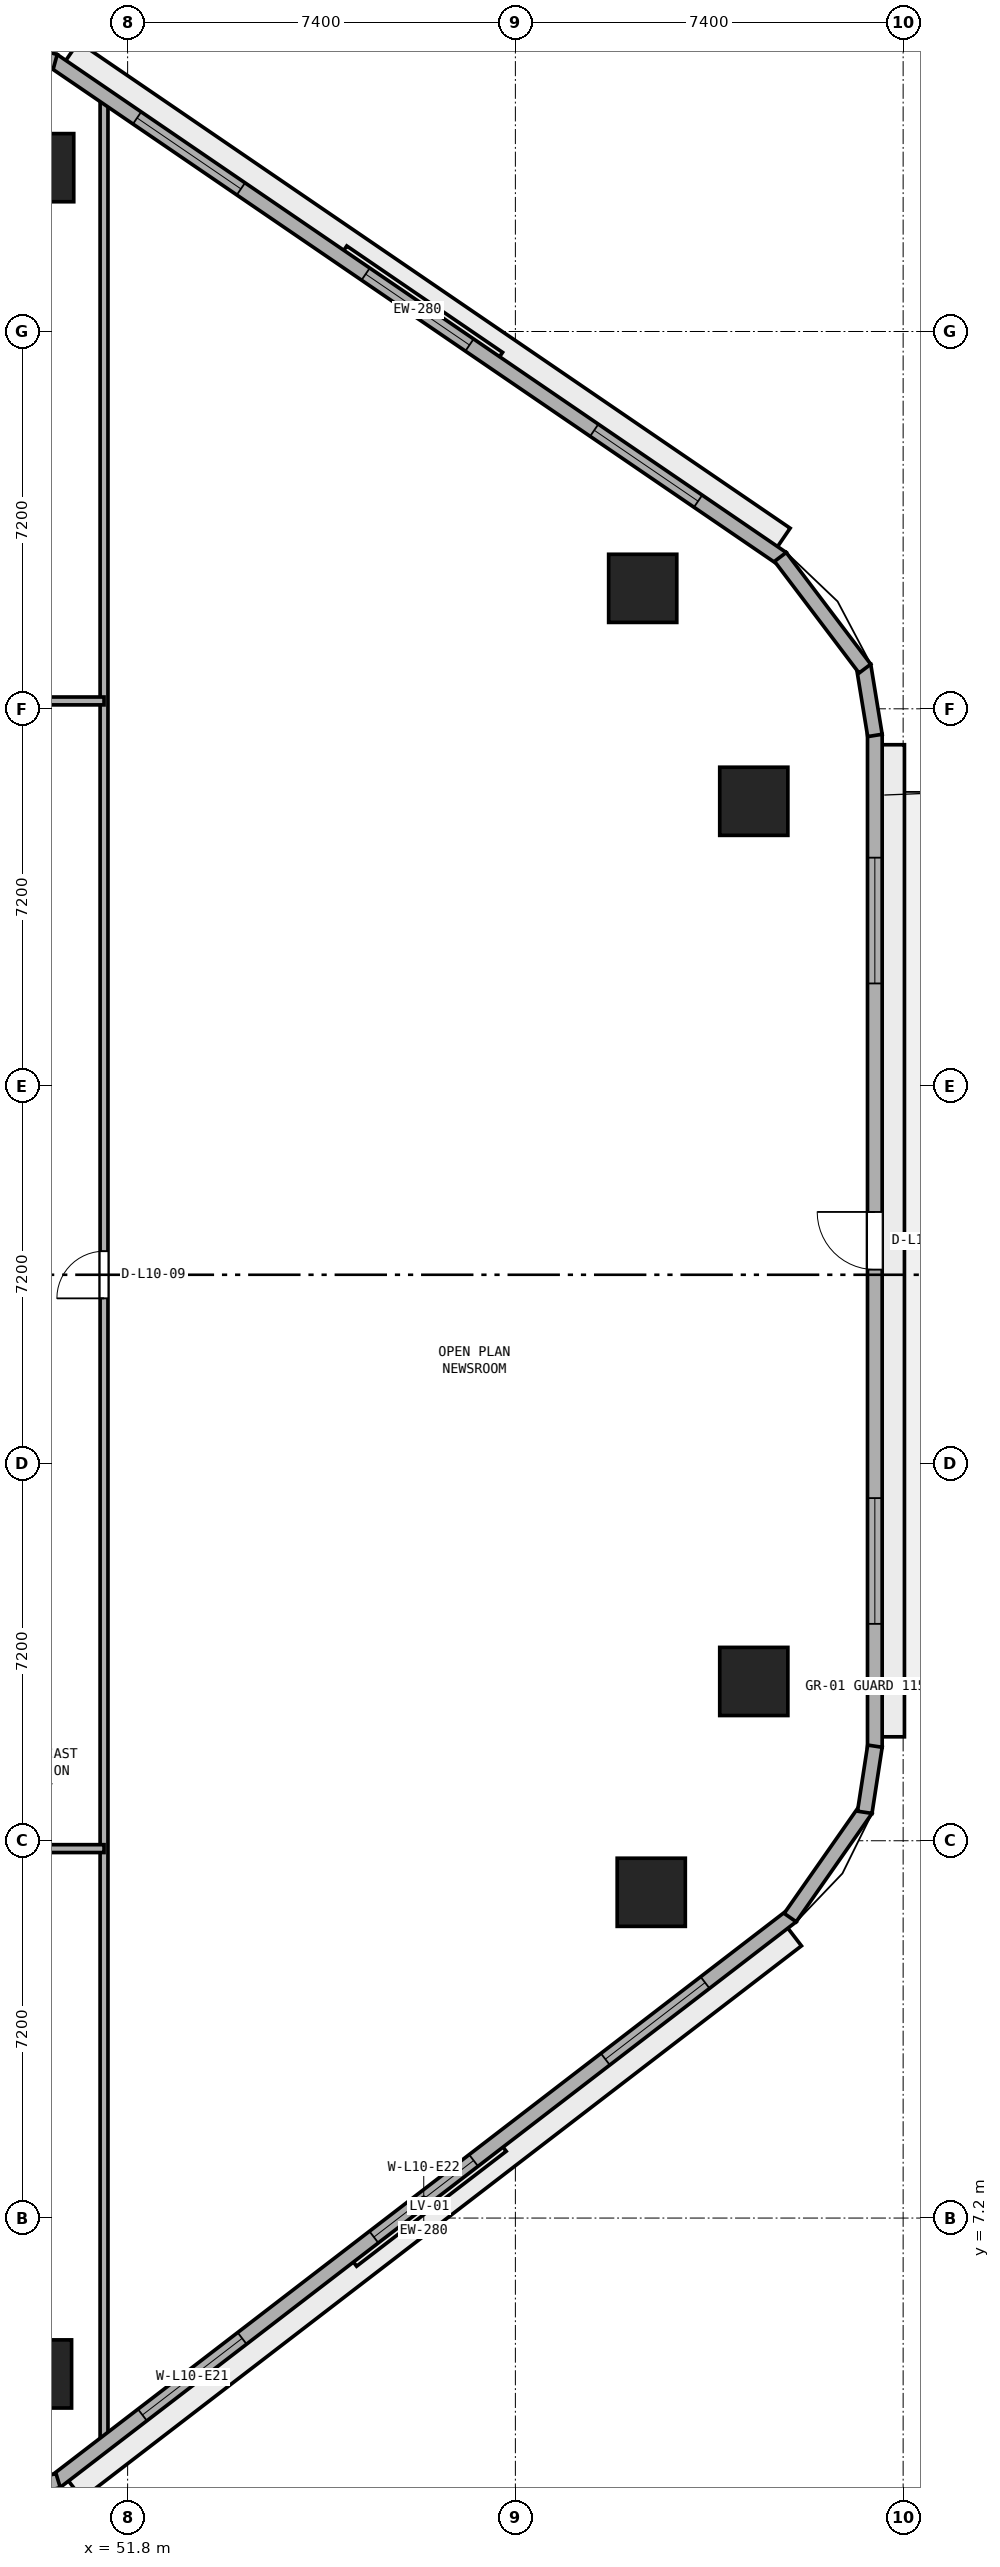
"""IFC4 building model, lengths in metres.
Left out: names, types, materials, properties, quantities, classifications, styles, units other than length and angle.
Written with IfcOpenShell. Run it as: python <this file> out.ifc"""

import sys

from ifc_helpers import new_model, si_unit, direction, frame, frame_2d, origin, origin_2d, place, context, subcontext, project, spatial, rectangle, extrude, element, fill, save


model = new_model("IFC4")
c1 = context("Model", 3, precision=1e-05, world=origin(), true_north=direction((0.0, 1.0)))
c2 = subcontext(c1, "Body", "Model", "MODEL_VIEW")
j1 = project(units=[si_unit("LENGTHUNIT", "METRE"), si_unit("PLANEANGLEUNIT", "RADIAN")], contexts=[c1])
p1 = place(None, origin())
s1 = spatial("IfcSite", under=j1, at=p1, CompositionType="ELEMENT")
p2 = place(p1, origin())
s2 = spatial("IfcBuilding", under=s1, at=p2, CompositionType="ELEMENT")
p3 = place(p2, frame((0.0, 0.0, 44.0)))
s3 = spatial("IfcBuildingStorey", under=s2, at=p3, CompositionType="ELEMENT", Elevation=44.0)
for number, where, z_axis, x_axis in (
    (1, (50.081, 4.225, 0.0), (0.0, 0.0, 1.0), (1.0, 0.0, 0.0)),
    (2, (61.793, 13.416, 0.0), (0.0, 0.0, 1.0), (1.0, 0.0, 0.0)),
    (3, (63.75, 17.44, 0.0), (0.0, 0.0, 1.0), (1.0, 0.0, 0.0)),
    (4, (63.75, 34.235, 0.0), (0.0, 0.0, 1.0), (1.0, 0.0, 0.0)),
    (5, (61.63, 38.299, 0.0), (0.0, 0.0, 1.0), (1.0, 0.0, 0.0)),
    (6, (50.122, 46.326, 0.0), (0.0, 0.0, 1.0), (1.0, 0.0, 0.0)),
):
    element("IfcColumn", number, at=place(p3, frame(where, z_axis=z_axis, x_axis=x_axis)), inside=s3, PredefinedType="COLUMN", context=c2, shape_type="SweptSolid", body=[
        extrude(rectangle(XDim=1.3, YDim=1.3, at=origin_2d()), origin(), (0.0, 0.0, 1.0), 3.8),
    ])
p4 = place(p3, frame((51.35, 2.843, 0.0), z_axis=(0.0, 0.0, 1.0), x_axis=(0.0, 1.0, 0.0)))
e7 = element("IfcWall", 7, at=p4, inside=s3, PredefinedType="PARTITIONING", context=c2, shape_type="SweptSolid", body=[
    extrude(rectangle(XDim=44.892, YDim=0.15, at=frame_2d((22.446, 0.0))), origin(), (0.0, 0.0, 1.0), 3.525),
])
p5 = place(p4, frame((21.907, 0.0, 0.0)))
e8 = element("IfcOpeningElement", 8, at=p5, cuts=e7, PredefinedType="OPENING", context=c2, shape_type="SweptSolid", body=[
    extrude(rectangle(XDim=0.9, YDim=2.1, at=frame_2d((0.45, 1.05))), frame((0.0, 0.085, 0.0), z_axis=(0.0, -1.0, 0.0), x_axis=(1.0, 0.0, 0.0)), (0.0, 0.0, 1.0), 0.17),
])
p6 = place(p3, frame((22.65, 14.25, 0.0), z_axis=(0.0, 0.0, 1.0), x_axis=(1.0, 0.0, 0.0)))
e9 = element("IfcWall", 9, at=p6, inside=s3, PredefinedType="PARTITIONING", context=c2, shape_type="SweptSolid", body=[
    extrude(rectangle(XDim=28.7, YDim=0.15, at=frame_2d((14.35, 0.0))), origin(), (0.0, 0.0, 1.0), 3.525),
])
p7 = place(p6, frame((4.845, 0.0, 0.0)))
e10 = element("IfcOpeningElement", 10, at=p7, cuts=e9, PredefinedType="OPENING", context=c2, shape_type="SweptSolid", body=[
    extrude(rectangle(XDim=0.9, YDim=2.1, at=frame_2d((0.45, 1.05))), frame((0.0, 0.085, 0.0), z_axis=(0.0, -1.0, 0.0), x_axis=(1.0, 0.0, 0.0)), (0.0, 0.0, 1.0), 0.17),
])
p8 = place(p6, frame((15.65, 0.0, 0.0)))
e11 = element("IfcOpeningElement", 11, at=p8, cuts=e9, PredefinedType="OPENING", context=c2, shape_type="SweptSolid", body=[
    extrude(rectangle(XDim=0.9, YDim=2.1, at=frame_2d((0.45, 1.05))), frame((0.0, 0.085, 0.0), z_axis=(0.0, -1.0, 0.0), x_axis=(1.0, 0.0, 0.0)), (0.0, 0.0, 1.0), 0.17),
])
p9 = place(p6, frame((24.705, 0.0, 0.0)))
e12 = element("IfcOpeningElement", 12, at=p9, cuts=e9, PredefinedType="OPENING", context=c2, shape_type="SweptSolid", body=[
    extrude(rectangle(XDim=0.9, YDim=2.1, at=frame_2d((0.45, 1.05))), frame((0.0, 0.085, 0.0), z_axis=(0.0, -1.0, 0.0), x_axis=(1.0, 0.0, 0.0)), (0.0, 0.0, 1.0), 0.17),
])
p10 = place(p3, frame((22.65, 36.15, 0.0), z_axis=(0.0, 0.0, 1.0), x_axis=(1.0, 0.0, 0.0)))
e13 = element("IfcWall", 13, at=p10, inside=s3, PredefinedType="PARTITIONING", context=c2, shape_type="SweptSolid", body=[
    extrude(rectangle(XDim=28.7, YDim=0.15, at=frame_2d((14.35, 0.0))), origin(), (0.0, 0.0, 1.0), 3.525),
])
p11 = place(p10, frame((6.095, 0.0, 0.0)))
e14 = element("IfcOpeningElement", 14, at=p11, cuts=e13, PredefinedType="OPENING", context=c2, shape_type="SweptSolid", body=[
    extrude(rectangle(XDim=0.9, YDim=2.1, at=frame_2d((0.45, 1.05))), frame((0.0, 0.085, 0.0), z_axis=(0.0, -1.0, 0.0), x_axis=(1.0, 0.0, 0.0)), (0.0, 0.0, 1.0), 0.17),
])
p12 = place(p10, frame((20.155, 0.0, 0.0)))
e15 = element("IfcOpeningElement", 15, at=p12, cuts=e13, PredefinedType="OPENING", context=c2, shape_type="SweptSolid", body=[
    extrude(rectangle(XDim=1.0, YDim=2.12, at=frame_2d((0.5, 1.06))), frame((0.0, 0.085, 0.0), z_axis=(0.0, -1.0, 0.0), x_axis=(1.0, 0.0, 0.0)), (0.0, 0.0, 1.0), 0.17),
])
p13 = place(p3, frame((50.429, 2.172, 0.0), z_axis=(0.0, 0.0, 1.0), x_axis=(0.792937466367, 0.609303023488, 0.0)))
e16 = element("IfcWall", 16, at=p13, inside=s3, PredefinedType="STANDARD", context=c2, shape_type="SweptSolid", body=[
    extrude(rectangle(XDim=17.713, YDim=0.28, at=frame_2d((8.856, 0.0))), origin(), (0.0, 0.0, 1.0), 3.525),
])
p14 = place(p13, frame((2.085, 0.0, 0.9)))
e17 = element("IfcOpeningElement", 17, at=p14, cuts=e16, PredefinedType="OPENING", context=c2, shape_type="SweptSolid", body=[
    extrude(rectangle(XDim=2.4, YDim=1.75, at=frame_2d((1.2, 0.875))), frame((0.0, 0.15, 0.0), z_axis=(0.0, -1.0, 0.0), x_axis=(1.0, 0.0, 0.0)), (0.0, 0.0, 1.0), 0.3),
])
p15 = place(p13, frame((7.656, 0.0, 0.9)))
e18 = element("IfcOpeningElement", 18, at=p15, cuts=e16, PredefinedType="OPENING", context=c2, shape_type="SweptSolid", body=[
    extrude(rectangle(XDim=2.4, YDim=1.75, at=frame_2d((1.2, 0.875))), frame((0.0, 0.15, 0.0), z_axis=(0.0, -1.0, 0.0), x_axis=(1.0, 0.0, 0.0)), (0.0, 0.0, 1.0), 0.3),
])
p16 = place(p13, frame((13.227, 0.0, 0.9)))
e19 = element("IfcOpeningElement", 19, at=p16, cuts=e16, PredefinedType="OPENING", context=c2, shape_type="SweptSolid", body=[
    extrude(rectangle(XDim=2.4, YDim=1.75, at=frame_2d((1.2, 0.875))), frame((0.0, 0.15, 0.0), z_axis=(0.0, -1.0, 0.0), x_axis=(1.0, 0.0, 0.0)), (0.0, 0.0, 1.0), 0.3),
])
p17 = place(p3, frame((66.06, 16.183, 0.0), z_axis=(0.0, 0.0, 1.0), x_axis=(0.0, 1.0, 0.0)))
e20 = element("IfcWall", 20, at=p17, inside=s3, PredefinedType="STANDARD", context=c2, shape_type="SweptSolid", body=[
    extrude(rectangle(XDim=19.331, YDim=0.28, at=frame_2d((9.666, 0.0))), origin(), (0.0, 0.0, 1.0), 3.525),
])
p18 = place(p17, frame((9.115, 0.0, 0.0)))
e21 = element("IfcOpeningElement", 21, at=p18, cuts=e20, PredefinedType="OPENING", context=c2, shape_type="SweptSolid", body=[
    extrude(rectangle(XDim=1.1, YDim=2.2, at=frame_2d((0.55, 1.1))), frame((0.0, 0.15, 0.0), z_axis=(0.0, -1.0, 0.0), x_axis=(1.0, 0.0, 0.0)), (0.0, 0.0, 1.0), 0.3),
])
p19 = place(p17, frame((2.355, 0.0, 0.9)))
e22 = element("IfcOpeningElement", 22, at=p19, cuts=e20, PredefinedType="OPENING", context=c2, shape_type="SweptSolid", body=[
    extrude(rectangle(XDim=2.4, YDim=1.75, at=frame_2d((1.2, 0.875))), frame((0.0, 0.15, 0.0), z_axis=(0.0, -1.0, 0.0), x_axis=(1.0, 0.0, 0.0)), (0.0, 0.0, 1.0), 0.3),
])
p20 = place(p17, frame((14.576, 0.0, 0.9)))
e23 = element("IfcOpeningElement", 23, at=p20, cuts=e20, PredefinedType="OPENING", context=c2, shape_type="SweptSolid", body=[
    extrude(rectangle(XDim=2.4, YDim=1.75, at=frame_2d((1.2, 0.875))), frame((0.0, 0.15, 0.0), z_axis=(0.0, -1.0, 0.0), x_axis=(1.0, 0.0, 0.0)), (0.0, 0.0, 1.0), 0.3),
])
p21 = place(p3, frame((64.29, 38.867, 0.0), z_axis=(0.0, 0.0, 1.0), x_axis=(-0.825755550159, 0.564028165416, 0.0)))
e24 = element("IfcWall", 24, at=p21, inside=s3, PredefinedType="STANDARD", context=c2, shape_type="SweptSolid", body=[
    extrude(rectangle(XDim=16.848, YDim=0.28, at=frame_2d((8.424, 0.0))), origin(), (0.0, 0.0, 1.0), 3.525),
])
p22 = place(p21, frame((1.941, 0.0, 0.9)))
e25 = element("IfcOpeningElement", 25, at=p22, cuts=e24, PredefinedType="OPENING", context=c2, shape_type="SweptSolid", body=[
    extrude(rectangle(XDim=2.4, YDim=1.75, at=frame_2d((1.2, 0.875))), frame((0.0, 0.15, 0.0), z_axis=(0.0, -1.0, 0.0), x_axis=(1.0, 0.0, 0.0)), (0.0, 0.0, 1.0), 0.3),
])
p23 = place(p21, frame((7.224, 0.0, 0.9)))
e26 = element("IfcOpeningElement", 26, at=p23, cuts=e24, PredefinedType="OPENING", context=c2, shape_type="SweptSolid", body=[
    extrude(rectangle(XDim=2.4, YDim=1.75, at=frame_2d((1.2, 0.875))), frame((0.0, 0.15, 0.0), z_axis=(0.0, -1.0, 0.0), x_axis=(1.0, 0.0, 0.0)), (0.0, 0.0, 1.0), 0.3),
])
p24 = place(p21, frame((12.507, 0.0, 0.9)))
e27 = element("IfcOpeningElement", 27, at=p24, cuts=e24, PredefinedType="OPENING", context=c2, shape_type="SweptSolid", body=[
    extrude(rectangle(XDim=2.4, YDim=1.75, at=frame_2d((1.2, 0.875))), frame((0.0, 0.15, 0.0), z_axis=(0.0, -1.0, 0.0), x_axis=(1.0, 0.0, 0.0)), (0.0, 0.0, 1.0), 0.3),
])
p25 = place(p3, frame((47.65, 1.333, 0.0), z_axis=(0.0, 0.0, 1.0), x_axis=(0.956461287977, 0.291859220516, 0.0)))
e28 = element("IfcWall", 28, at=p25, inside=s3, PredefinedType="STANDARD", context=c2, shape_type="SweptSolid", body=[
    extrude(rectangle(XDim=2.952, YDim=0.28, at=frame_2d((1.476, 0.0))), origin(), (0.0, 0.0, 1.0), 3.525),
])
p26 = place(p3, frame((64.444, 12.933, 0.0), z_axis=(0.0, 0.0, 1.0), x_axis=(0.573176686443, 0.819431806875, 0.0)))
e29 = element("IfcWall", 29, at=p26, inside=s3, PredefinedType="STANDARD", context=c2, shape_type="SweptSolid", body=[
    extrude(rectangle(XDim=2.524, YDim=0.28, at=frame_2d((1.262, 0.0))), origin(), (0.0, 0.0, 1.0), 3.525),
])
p27 = place(p3, frame((65.867, 14.943, 0.0), z_axis=(0.0, 0.0, 1.0), x_axis=(0.152014078361, 0.988378328364, 0.0)))
e30 = element("IfcWall", 30, at=p27, inside=s3, PredefinedType="STANDARD", context=c2, shape_type="SweptSolid", body=[
    extrude(rectangle(XDim=1.277, YDim=0.28, at=frame_2d((0.638, 0.0))), origin(), (0.0, 0.0, 1.0), 3.525),
])
p28 = place(p3, frame((66.062, 35.492, 0.0), z_axis=(0.0, 0.0, 1.0), x_axis=(-0.161182073582, 0.986924687682, 0.0)))
e31 = element("IfcWall", 31, at=p28, inside=s3, PredefinedType="STANDARD", context=c2, shape_type="SweptSolid", body=[
    extrude(rectangle(XDim=1.354, YDim=0.28, at=frame_2d((0.677, 0.0))), origin(), (0.0, 0.0, 1.0), 3.525),
])
p29 = place(p3, frame((65.87, 36.767, 0.0), z_axis=(0.0, 0.0, 1.0), x_axis=(-0.603370463754, 0.797461023166, 0.0)))
e32 = element("IfcWall", 32, at=p29, inside=s3, PredefinedType="STANDARD", context=c2, shape_type="SweptSolid", body=[
    extrude(rectangle(XDim=2.673, YDim=0.28, at=frame_2d((1.336, 0.0))), origin(), (0.0, 0.0, 1.0), 3.525),
])
p30 = place(p3, frame((50.419, 48.351, 0.0), z_axis=(0.0, 0.0, 1.0), x_axis=(-0.964254516967, 0.264977784933, 0.0)))
e33 = element("IfcWall", 33, at=p30, inside=s3, PredefinedType="STANDARD", context=c2, shape_type="SweptSolid", body=[
    extrude(rectangle(XDim=2.731, YDim=0.28, at=frame_2d((1.365, 0.0))), origin(), (0.0, 0.0, 1.0), 3.525),
])
p31 = place(p5, origin())
e34 = element("IfcDoor", 34, at=p31, inside=s3, OperationType="SINGLE_SWING_LEFT", PredefinedType="DOOR", context=c2, shape_type="SweptSolid", body=[
    extrude(rectangle(XDim=0.9, YDim=2.1, at=frame_2d((0.45, 1.05))), frame((0.0, 0.025, 0.0), z_axis=(0.0, -1.0, 0.0), x_axis=(1.0, 0.0, 0.0)), (0.0, 0.0, 1.0), 0.05),
])
fill(e8, e34)
p32 = place(p14, origin())
e35 = element("IfcWindow", 35, at=p32, inside=s3, PartitioningType="SINGLE_PANEL", PredefinedType="WINDOW", context=c2, shape_type="SweptSolid", body=[
    extrude(rectangle(XDim=2.4, YDim=1.75, at=frame_2d((1.2, 0.875))), frame((0.0, 0.03, 0.0), z_axis=(0.0, -1.0, 0.0), x_axis=(1.0, 0.0, 0.0)), (0.0, 0.0, 1.0), 0.06),
])
fill(e17, e35)
p33 = place(p15, origin())
e36 = element("IfcWindow", 36, at=p33, inside=s3, PartitioningType="SINGLE_PANEL", PredefinedType="WINDOW", context=c2, shape_type="SweptSolid", body=[
    extrude(rectangle(XDim=2.4, YDim=1.75, at=frame_2d((1.2, 0.875))), frame((0.0, 0.03, 0.0), z_axis=(0.0, -1.0, 0.0), x_axis=(1.0, 0.0, 0.0)), (0.0, 0.0, 1.0), 0.06),
])
fill(e18, e36)
p34 = place(p16, origin())
e37 = element("IfcWindow", 37, at=p34, inside=s3, PartitioningType="SINGLE_PANEL", PredefinedType="WINDOW", context=c2, shape_type="SweptSolid", body=[
    extrude(rectangle(XDim=2.4, YDim=1.75, at=frame_2d((1.2, 0.875))), frame((0.0, 0.03, 0.0), z_axis=(0.0, -1.0, 0.0), x_axis=(1.0, 0.0, 0.0)), (0.0, 0.0, 1.0), 0.06),
])
fill(e19, e37)
p35 = place(p18, origin())
e38 = element("IfcDoor", 38, at=p35, inside=s3, OperationType="SINGLE_SWING_RIGHT", PredefinedType="DOOR", context=c2, shape_type="SweptSolid", body=[
    extrude(rectangle(XDim=1.1, YDim=2.2, at=frame_2d((0.55, 1.1))), frame((0.0, 0.025, 0.0), z_axis=(0.0, -1.0, 0.0), x_axis=(1.0, 0.0, 0.0)), (0.0, 0.0, 1.0), 0.05),
])
fill(e21, e38)
p36 = place(p19, origin())
e39 = element("IfcWindow", 39, at=p36, inside=s3, PartitioningType="SINGLE_PANEL", PredefinedType="WINDOW", context=c2, shape_type="SweptSolid", body=[
    extrude(rectangle(XDim=2.4, YDim=1.75, at=frame_2d((1.2, 0.875))), frame((0.0, 0.03, 0.0), z_axis=(0.0, -1.0, 0.0), x_axis=(1.0, 0.0, 0.0)), (0.0, 0.0, 1.0), 0.06),
])
fill(e22, e39)
p37 = place(p20, origin())
e40 = element("IfcWindow", 40, at=p37, inside=s3, PartitioningType="SINGLE_PANEL", PredefinedType="WINDOW", context=c2, shape_type="SweptSolid", body=[
    extrude(rectangle(XDim=2.4, YDim=1.75, at=frame_2d((1.2, 0.875))), frame((0.0, 0.03, 0.0), z_axis=(0.0, -1.0, 0.0), x_axis=(1.0, 0.0, 0.0)), (0.0, 0.0, 1.0), 0.06),
])
fill(e23, e40)
p38 = place(p22, origin())
e41 = element("IfcWindow", 41, at=p38, inside=s3, PartitioningType="SINGLE_PANEL", PredefinedType="WINDOW", context=c2, shape_type="SweptSolid", body=[
    extrude(rectangle(XDim=2.4, YDim=1.75, at=frame_2d((1.2, 0.875))), frame((0.0, 0.03, 0.0), z_axis=(0.0, -1.0, 0.0), x_axis=(1.0, 0.0, 0.0)), (0.0, 0.0, 1.0), 0.06),
])
fill(e25, e41)
p39 = place(p23, origin())
e42 = element("IfcWindow", 42, at=p39, inside=s3, PartitioningType="SINGLE_PANEL", PredefinedType="WINDOW", context=c2, shape_type="SweptSolid", body=[
    extrude(rectangle(XDim=2.4, YDim=1.75, at=frame_2d((1.2, 0.875))), frame((0.0, 0.03, 0.0), z_axis=(0.0, -1.0, 0.0), x_axis=(1.0, 0.0, 0.0)), (0.0, 0.0, 1.0), 0.06),
])
fill(e26, e42)
p40 = place(p24, origin())
e43 = element("IfcWindow", 43, at=p40, inside=s3, PartitioningType="SINGLE_PANEL", PredefinedType="WINDOW", context=c2, shape_type="SweptSolid", body=[
    extrude(rectangle(XDim=2.4, YDim=1.75, at=frame_2d((1.2, 0.875))), frame((0.0, 0.03, 0.0), z_axis=(0.0, -1.0, 0.0), x_axis=(1.0, 0.0, 0.0)), (0.0, 0.0, 1.0), 0.06),
])
fill(e27, e43)
save(model, sys.argv[1])
